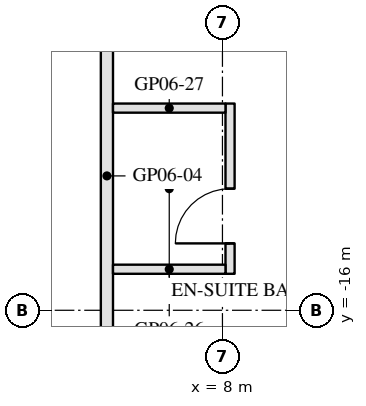
"""IFC4 building model, lengths in metres.
Left out: names, types, materials, properties, quantities, classifications, styles, units other than length and angle.
Written with IfcOpenShell. Run it as: python <this file> out.ifc"""

import sys

from ifc_helpers import new_model, si_unit, direction, frame, frame_2d, origin, place, context, subcontext, project, spatial, rectangle, extrude, element, fill, save


model = new_model("IFC4")
c1 = context("Model", 3, precision=1e-05, world=origin(), true_north=direction((0.0, 1.0)))
c2 = subcontext(c1, "Body", "Model", "MODEL_VIEW")
j1 = project(units=[si_unit("LENGTHUNIT", "METRE"), si_unit("PLANEANGLEUNIT", "RADIAN")], contexts=[c1])
p1 = place(None, origin())
s1 = spatial("IfcSite", under=j1, at=p1, CompositionType="ELEMENT")
p2 = place(p1, origin())
s2 = spatial("IfcBuilding", under=s1, at=p2, CompositionType="ELEMENT")
p3 = place(p2, frame((0.0, 0.0, 87.2)))
s3 = spatial("IfcBuildingStorey", under=s2, at=p3, CompositionType="ELEMENT", Elevation=87.2)
p4 = place(p3, frame((8.547, -10.997, 0.0), z_axis=(0.0, 0.0, 1.0), x_axis=(0.866025009528, -0.500000682871, 0.0)))
e1 = element("IfcWall", 1, at=p4, inside=s3, PredefinedType="SHEAR", context=c2, shape_type="SweptSolid", body=[
    extrude(rectangle(XDim=14.837, YDim=0.5, at=frame_2d((7.418, 0.0))), origin(), (0.0, 0.0, 1.0), 3.5),
])
p5 = place(p3, frame((6.1, -19.28, 0.0), z_axis=(0.0, 0.0, 1.0), x_axis=(0.0, 1.0, 0.0)))
e2 = element("IfcWall", 2, at=p5, inside=s3, PredefinedType="PARTITIONING", context=c2, shape_type="SweptSolid", body=[
    extrude(rectangle(XDim=10.98, YDim=0.2, at=frame_2d((5.49, 0.0))), origin(), (0.0, 0.0, 1.0), 2.96),
])
p6 = place(p3, frame((8.125, -15.4, 0.0), z_axis=(0.0, 0.0, 1.0), x_axis=(0.0, 1.0, 0.0)))
e3 = element("IfcWall", 3, at=p6, inside=s3, PredefinedType="PARTITIONING", context=c2, shape_type="SweptSolid", body=[
    extrude(rectangle(XDim=2.8, YDim=0.15, at=frame_2d((1.4, 0.0))), origin(), (0.0, 0.0, 1.0), 3.55),
])
p7 = place(p6, frame((0.5, 0.0, 0.0)))
e4 = element("IfcOpeningElement", 4, at=p7, cuts=e3, PredefinedType="OPENING", context=c2, shape_type="SweptSolid", body=[
    extrude(rectangle(XDim=0.9, YDim=2.1, at=frame_2d((0.45, 1.05))), frame((0.0, 0.085, 0.0), z_axis=(0.0, -1.0, 0.0), x_axis=(1.0, 0.0, 0.0)), (0.0, 0.0, 1.0), 0.17),
])
for number, where, z_axis, x_axis in (
    (5, (6.2, -15.325, 0.0), (0.0, 0.0, 1.0), (1.0, 0.0, 0.0)),
    (6, (6.2, -12.675, 0.0), (0.0, 0.0, 1.0), (1.0, 0.0, 0.0)),
):
    element("IfcWall", number, at=place(p3, frame(where, z_axis=z_axis, x_axis=x_axis)), inside=s3, PredefinedType="PARTITIONING", context=c2, shape_type="SweptSolid", body=[
        extrude(rectangle(XDim=1.85, YDim=0.15, at=frame_2d((0.925, 0.0))), origin(), (0.0, 0.0, 1.0), 2.95),
    ])
p8 = place(p7, origin())
e7 = element("IfcDoor", 7, at=p8, inside=s3, OperationType="SINGLE_SWING_LEFT", PredefinedType="DOOR", context=c2, shape_type="SweptSolid", body=[
    extrude(rectangle(XDim=0.9, YDim=2.1, at=frame_2d((0.45, 1.05))), frame((0.0, 0.025, 0.0), z_axis=(0.0, -1.0, 0.0), x_axis=(1.0, 0.0, 0.0)), (0.0, 0.0, 1.0), 0.05),
])
fill(e4, e7)
save(model, sys.argv[1])
